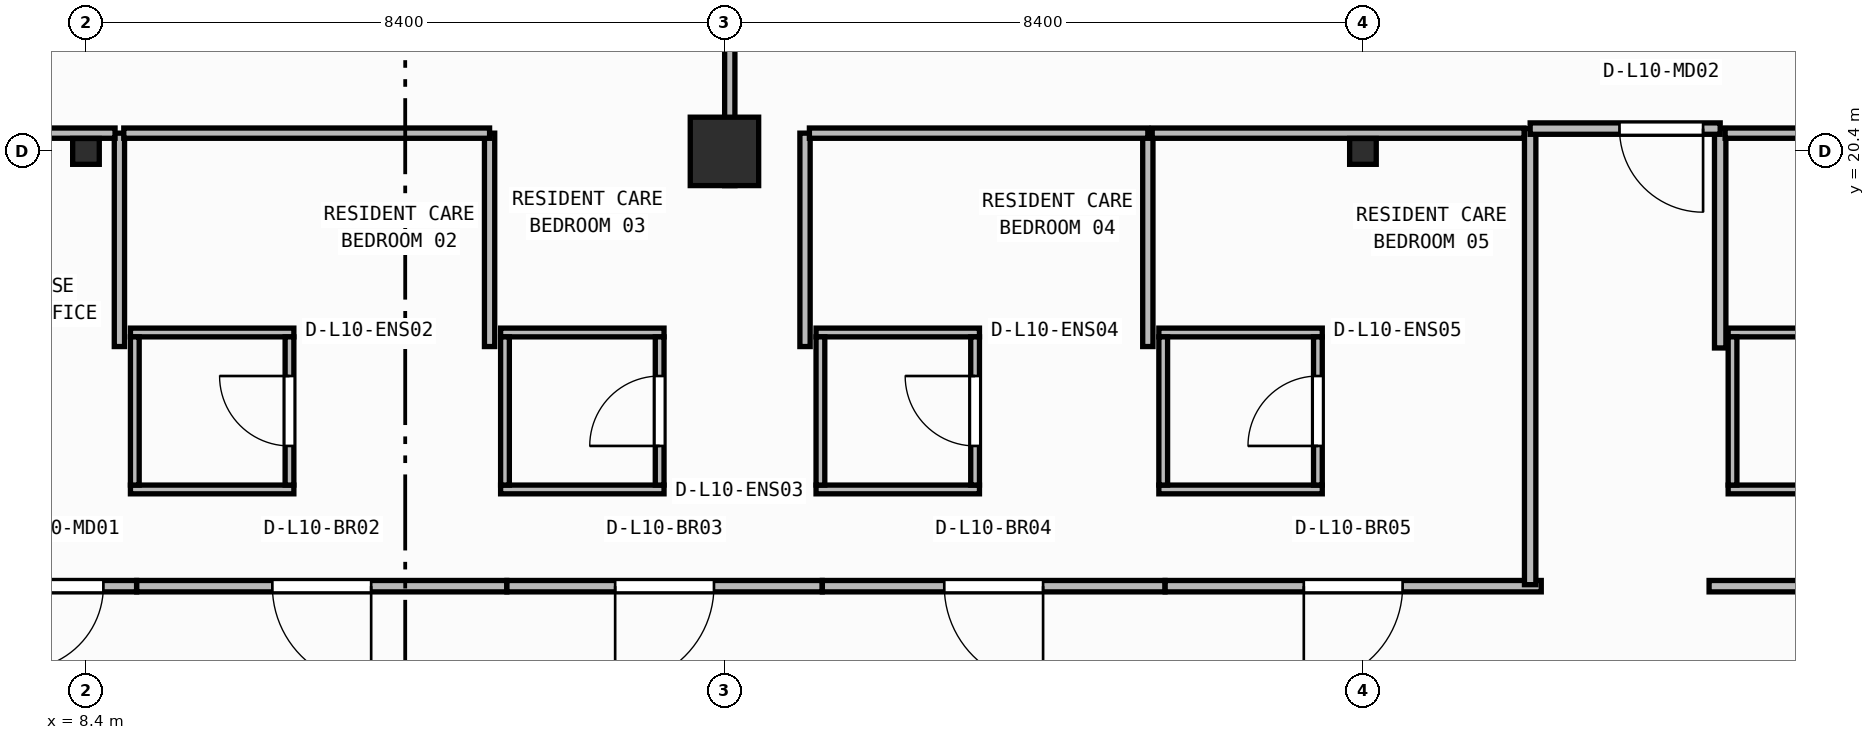
"""IFC4 building model, lengths in metres.
Left out: names, types, materials, properties, quantities, classifications, styles, units other than length and angle.
Written with IfcOpenShell. Run it as: python <this file> out.ifc"""

import sys

from ifc_helpers import new_model, si_unit, direction, frame, frame_2d, origin, origin_2d, place, context, subcontext, project, spatial, rectangle, i_section, extrude, element, fill, save


model = new_model("IFC4")
c1 = context("Model", 3, precision=1e-05, world=origin(), true_north=direction((0.0, 1.0)))
c2 = subcontext(c1, "Body", "Model", "MODEL_VIEW")
j1 = project(units=[si_unit("LENGTHUNIT", "METRE"), si_unit("PLANEANGLEUNIT", "RADIAN")], contexts=[c1])
p1 = place(None, origin())
s1 = spatial("IfcSite", under=j1, at=p1, CompositionType="ELEMENT")
p2 = place(p1, origin())
s2 = spatial("IfcBuilding", under=s1, at=p2, CompositionType="ELEMENT")
p3 = place(p2, frame((0.0, 0.0, 42.25)))
s3 = spatial("IfcBuildingStorey", under=s2, at=p3, CompositionType="ELEMENT", Elevation=42.25)
p4 = place(p3, frame((8.4, 20.4, 0.0), z_axis=(0.0, 0.0, 1.0), x_axis=(1.0, 0.0, 0.0)))
e1 = element("IfcColumn", 1, at=p4, inside=s3, PredefinedType="COLUMN", context=c2, shape_type="SweptSolid", body=[
    extrude(i_section(OverallWidth=0.35, OverallDepth=0.34, WebThickness=0.016, FlangeThickness=0.028, at=origin_2d()), origin(), (0.0, 0.0, 1.0), 3.95),
])
p5 = place(p3, frame((16.8, 20.4, 0.0), z_axis=(0.0, 0.0, 1.0), x_axis=(1.0, 0.0, 0.0)))
e2 = element("IfcColumn", 2, at=p5, inside=s3, PredefinedType="COLUMN", context=c2, shape_type="SweptSolid", body=[
    extrude(rectangle(XDim=0.9, YDim=0.9, at=origin_2d()), origin(), (0.0, 0.0, 1.0), 3.95),
])
p6 = place(p3, frame((25.2, 20.4, 0.0), z_axis=(0.0, 0.0, 1.0), x_axis=(1.0, 0.0, 0.0)))
e3 = element("IfcColumn", 3, at=p6, inside=s3, PredefinedType="COLUMN", context=c2, shape_type="SweptSolid", body=[
    extrude(i_section(OverallWidth=0.35, OverallDepth=0.34, WebThickness=0.016, FlangeThickness=0.028, at=origin_2d()), origin(), (0.0, 0.0, 1.0), 3.95),
])
for number, where, z_axis, x_axis in (
    (4, (8.985, 15.952, 0.0), (0.0, 0.0, 1.0), (1.0, 0.0, 0.0)),
    (5, (8.985, 18.018, 0.0), (0.0, 0.0, 1.0), (1.0, 0.0, 0.0)),
):
    element("IfcWall", number, at=place(p3, frame(where, z_axis=z_axis, x_axis=x_axis)), inside=s3, PredefinedType="PARTITIONING", context=c2, shape_type="SweptSolid", body=[
        extrude(rectangle(XDim=2.15, YDim=0.115, at=frame_2d((1.075, 0.0))), origin(), (0.0, 0.0, 1.0), 3.71),
    ])
p7 = place(p3, frame((9.042, 16.01, 0.0), z_axis=(0.0, 0.0, 1.0), x_axis=(0.0, 1.0, 0.0)))
e6 = element("IfcWall", 6, at=p7, inside=s3, PredefinedType="PARTITIONING", context=c2, shape_type="SweptSolid", body=[
    extrude(rectangle(XDim=1.95, YDim=0.115, at=frame_2d((0.975, 0.0))), origin(), (0.0, 0.0, 1.0), 3.71),
])
p8 = place(p3, frame((11.077, 16.01, 0.0), z_axis=(0.0, 0.0, 1.0), x_axis=(0.0, 1.0, 0.0)))
e7 = element("IfcWall", 7, at=p8, inside=s3, PredefinedType="PARTITIONING", context=c2, shape_type="SweptSolid", body=[
    extrude(rectangle(XDim=1.95, YDim=0.115, at=frame_2d((0.975, 0.0))), origin(), (0.0, 0.0, 1.0), 3.71),
])
p9 = place(p8, frame((0.515, 0.0, 0.0)))
e8 = element("IfcOpeningElement", 8, at=p9, cuts=e7, PredefinedType="OPENING", context=c2, shape_type="SweptSolid", body=[
    extrude(rectangle(XDim=0.92, YDim=2.1, at=frame_2d((0.46, 1.05))), frame((0.0, 0.067, 0.0), z_axis=(0.0, -1.0, 0.0), x_axis=(1.0, 0.0, 0.0)), (0.0, 0.0, 1.0), 0.135),
])
for number, where, z_axis, x_axis in (
    (9, (13.855, 15.952, 0.0), (0.0, 0.0, 1.0), (1.0, 0.0, 0.0)),
    (10, (13.855, 18.018, 0.0), (0.0, 0.0, 1.0), (1.0, 0.0, 0.0)),
):
    element("IfcWall", number, at=place(p3, frame(where, z_axis=z_axis, x_axis=x_axis)), inside=s3, PredefinedType="PARTITIONING", context=c2, shape_type="SweptSolid", body=[
        extrude(rectangle(XDim=2.15, YDim=0.115, at=frame_2d((1.075, 0.0))), origin(), (0.0, 0.0, 1.0), 3.71),
    ])
p10 = place(p3, frame((13.913, 16.01, 0.0), z_axis=(0.0, 0.0, 1.0), x_axis=(0.0, 1.0, 0.0)))
e11 = element("IfcWall", 11, at=p10, inside=s3, PredefinedType="PARTITIONING", context=c2, shape_type="SweptSolid", body=[
    extrude(rectangle(XDim=1.95, YDim=0.115, at=frame_2d((0.975, 0.0))), origin(), (0.0, 0.0, 1.0), 3.71),
])
p11 = place(p3, frame((15.948, 16.01, 0.0), z_axis=(0.0, 0.0, 1.0), x_axis=(0.0, 1.0, 0.0)))
e12 = element("IfcWall", 12, at=p11, inside=s3, PredefinedType="PARTITIONING", context=c2, shape_type="SweptSolid", body=[
    extrude(rectangle(XDim=1.95, YDim=0.115, at=frame_2d((0.975, 0.0))), origin(), (0.0, 0.0, 1.0), 3.71),
])
p12 = place(p11, frame((0.515, 0.0, 0.0)))
e13 = element("IfcOpeningElement", 13, at=p12, cuts=e12, PredefinedType="OPENING", context=c2, shape_type="SweptSolid", body=[
    extrude(rectangle(XDim=0.92, YDim=2.1, at=frame_2d((0.46, 1.05))), frame((0.0, 0.067, 0.0), z_axis=(0.0, -1.0, 0.0), x_axis=(1.0, 0.0, 0.0)), (0.0, 0.0, 1.0), 0.135),
])
for number, where, z_axis, x_axis in (
    (14, (18.005, 15.952, 0.0), (0.0, 0.0, 1.0), (1.0, 0.0, 0.0)),
    (15, (18.005, 18.018, 0.0), (0.0, 0.0, 1.0), (1.0, 0.0, 0.0)),
):
    element("IfcWall", number, at=place(p3, frame(where, z_axis=z_axis, x_axis=x_axis)), inside=s3, PredefinedType="PARTITIONING", context=c2, shape_type="SweptSolid", body=[
        extrude(rectangle(XDim=2.15, YDim=0.115, at=frame_2d((1.075, 0.0))), origin(), (0.0, 0.0, 1.0), 3.71),
    ])
p13 = place(p3, frame((18.062, 16.01, 0.0), z_axis=(0.0, 0.0, 1.0), x_axis=(0.0, 1.0, 0.0)))
e16 = element("IfcWall", 16, at=p13, inside=s3, PredefinedType="PARTITIONING", context=c2, shape_type="SweptSolid", body=[
    extrude(rectangle(XDim=1.95, YDim=0.115, at=frame_2d((0.975, 0.0))), origin(), (0.0, 0.0, 1.0), 3.71),
])
p14 = place(p3, frame((20.097, 16.01, 0.0), z_axis=(0.0, 0.0, 1.0), x_axis=(0.0, 1.0, 0.0)))
e17 = element("IfcWall", 17, at=p14, inside=s3, PredefinedType="PARTITIONING", context=c2, shape_type="SweptSolid", body=[
    extrude(rectangle(XDim=1.95, YDim=0.115, at=frame_2d((0.975, 0.0))), origin(), (0.0, 0.0, 1.0), 3.71),
])
p15 = place(p14, frame((0.515, 0.0, 0.0)))
e18 = element("IfcOpeningElement", 18, at=p15, cuts=e17, PredefinedType="OPENING", context=c2, shape_type="SweptSolid", body=[
    extrude(rectangle(XDim=0.92, YDim=2.1, at=frame_2d((0.46, 1.05))), frame((0.0, 0.067, 0.0), z_axis=(0.0, -1.0, 0.0), x_axis=(1.0, 0.0, 0.0)), (0.0, 0.0, 1.0), 0.135),
])
for number, where, z_axis, x_axis in (
    (19, (22.515, 15.952, 0.0), (0.0, 0.0, 1.0), (1.0, 0.0, 0.0)),
    (20, (22.515, 18.018, 0.0), (0.0, 0.0, 1.0), (1.0, 0.0, 0.0)),
):
    element("IfcWall", number, at=place(p3, frame(where, z_axis=z_axis, x_axis=x_axis)), inside=s3, PredefinedType="PARTITIONING", context=c2, shape_type="SweptSolid", body=[
        extrude(rectangle(XDim=2.15, YDim=0.115, at=frame_2d((1.075, 0.0))), origin(), (0.0, 0.0, 1.0), 3.71),
    ])
p16 = place(p3, frame((22.573, 16.01, 0.0), z_axis=(0.0, 0.0, 1.0), x_axis=(0.0, 1.0, 0.0)))
e21 = element("IfcWall", 21, at=p16, inside=s3, PredefinedType="PARTITIONING", context=c2, shape_type="SweptSolid", body=[
    extrude(rectangle(XDim=1.95, YDim=0.115, at=frame_2d((0.975, 0.0))), origin(), (0.0, 0.0, 1.0), 3.71),
])
p17 = place(p3, frame((24.607, 16.01, 0.0), z_axis=(0.0, 0.0, 1.0), x_axis=(0.0, 1.0, 0.0)))
e22 = element("IfcWall", 22, at=p17, inside=s3, PredefinedType="PARTITIONING", context=c2, shape_type="SweptSolid", body=[
    extrude(rectangle(XDim=1.95, YDim=0.115, at=frame_2d((0.975, 0.0))), origin(), (0.0, 0.0, 1.0), 3.71),
])
p18 = place(p17, frame((0.515, 0.0, 0.0)))
e23 = element("IfcOpeningElement", 23, at=p18, cuts=e22, PredefinedType="OPENING", context=c2, shape_type="SweptSolid", body=[
    extrude(rectangle(XDim=0.92, YDim=2.1, at=frame_2d((0.46, 1.05))), frame((0.0, 0.067, 0.0), z_axis=(0.0, -1.0, 0.0), x_axis=(1.0, 0.0, 0.0)), (0.0, 0.0, 1.0), 0.135),
])
p19 = place(p3, frame((30.005, 15.952, 0.0), z_axis=(0.0, 0.0, 1.0), x_axis=(1.0, 0.0, 0.0)))
e24 = element("IfcWall", 24, at=p19, inside=s3, PredefinedType="PARTITIONING", context=c2, shape_type="SweptSolid", body=[
    extrude(rectangle(XDim=2.15, YDim=0.115, at=frame_2d((1.075, 0.0))), origin(), (0.0, 0.0, 1.0), 3.381),
])
p20 = place(p3, frame((30.005, 18.018, 0.0), z_axis=(0.0, 0.0, 1.0), x_axis=(1.0, 0.0, 0.0)))
e25 = element("IfcWall", 25, at=p20, inside=s3, PredefinedType="PARTITIONING", context=c2, shape_type="SweptSolid", body=[
    extrude(rectangle(XDim=2.15, YDim=0.115, at=frame_2d((1.075, 0.0))), origin(), (0.0, 0.0, 1.0), 3.71),
])
p21 = place(p3, frame((30.062, 16.01, 0.0), z_axis=(0.0, 0.0, 1.0), x_axis=(0.0, 1.0, 0.0)))
e26 = element("IfcWall", 26, at=p21, inside=s3, PredefinedType="PARTITIONING", context=c2, shape_type="SweptSolid", body=[
    extrude(rectangle(XDim=1.95, YDim=0.115, at=frame_2d((0.975, 0.0))), origin(), (0.0, 0.0, 1.0), 3.71),
])
p22 = place(p3, frame((9.066, 14.68, 0.0), z_axis=(0.0, 0.0, 1.0), x_axis=(-1.0, 0.0, 0.0)))
e27 = element("IfcWall", 27, at=p22, inside=s3, PredefinedType="PARTITIONING", context=c2, shape_type="SweptSolid", body=[
    extrude(rectangle(XDim=1.974, YDim=0.15, at=frame_2d((0.987, 0.0))), origin(), (0.0, 0.0, 1.0), 3.71),
])
p23 = place(p22, frame((0.437, 0.0, 0.0)))
e28 = element("IfcOpeningElement", 28, at=p23, cuts=e27, PredefinedType="OPENING", context=c2, shape_type="SweptSolid", body=[
    extrude(rectangle(XDim=1.1, YDim=2.1, at=frame_2d((0.55, 1.05))), frame((0.0, 0.085, 0.0), z_axis=(0.0, -1.0, 0.0), x_axis=(1.0, 0.0, 0.0)), (0.0, 0.0, 1.0), 0.17),
])
p24 = place(p3, frame((13.936, 14.68, 0.0), z_axis=(0.0, 0.0, 1.0), x_axis=(-1.0, 0.0, 0.0)))
e29 = element("IfcWall", 29, at=p24, inside=s3, PredefinedType="PARTITIONING", context=c2, shape_type="SweptSolid", body=[
    extrude(rectangle(XDim=4.868, YDim=0.15, at=frame_2d((2.434, 0.0))), origin(), (0.0, 0.0, 1.0), 3.71),
])
p25 = place(p24, frame((1.784, 0.0, 0.0)))
e30 = element("IfcOpeningElement", 30, at=p25, cuts=e29, PredefinedType="OPENING", context=c2, shape_type="SweptSolid", body=[
    extrude(rectangle(XDim=1.3, YDim=2.15, at=frame_2d((0.65, 1.075))), frame((0.0, 0.085, 0.0), z_axis=(0.0, -1.0, 0.0), x_axis=(1.0, 0.0, 0.0)), (0.0, 0.0, 1.0), 0.17),
])
p26 = place(p3, frame((18.086, 14.68, 0.0), z_axis=(0.0, 0.0, 1.0), x_axis=(-1.0, 0.0, 0.0)))
e31 = element("IfcWall", 31, at=p26, inside=s3, PredefinedType="PARTITIONING", context=c2, shape_type="SweptSolid", body=[
    extrude(rectangle(XDim=4.148, YDim=0.15, at=frame_2d((2.074, 0.0))), origin(), (0.0, 0.0, 1.0), 3.71),
])
p27 = place(p26, frame((1.424, 0.0, 0.0)))
e32 = element("IfcOpeningElement", 32, at=p27, cuts=e31, PredefinedType="OPENING", context=c2, shape_type="SweptSolid", body=[
    extrude(rectangle(XDim=1.3, YDim=2.15, at=frame_2d((0.65, 1.075))), frame((0.0, 0.085, 0.0), z_axis=(0.0, -1.0, 0.0), x_axis=(1.0, 0.0, 0.0)), (0.0, 0.0, 1.0), 0.17),
])
p28 = place(p3, frame((22.596, 14.68, 0.0), z_axis=(0.0, 0.0, 1.0), x_axis=(-1.0, 0.0, 0.0)))
e33 = element("IfcWall", 33, at=p28, inside=s3, PredefinedType="PARTITIONING", context=c2, shape_type="SweptSolid", body=[
    extrude(rectangle(XDim=4.508, YDim=0.15, at=frame_2d((2.254, 0.0))), origin(), (0.0, 0.0, 1.0), 3.71),
])
p29 = place(p28, frame((1.604, 0.0, 0.0)))
e34 = element("IfcOpeningElement", 34, at=p29, cuts=e33, PredefinedType="OPENING", context=c2, shape_type="SweptSolid", body=[
    extrude(rectangle(XDim=1.3, YDim=2.15, at=frame_2d((0.65, 1.075))), frame((0.0, 0.085, 0.0), z_axis=(0.0, -1.0, 0.0), x_axis=(1.0, 0.0, 0.0)), (0.0, 0.0, 1.0), 0.17),
])
p30 = place(p3, frame((27.546, 14.68, 0.0), z_axis=(0.0, 0.0, 1.0), x_axis=(-1.0, 0.0, 0.0)))
e35 = element("IfcWall", 35, at=p30, inside=s3, PredefinedType="PARTITIONING", context=c2, shape_type="SweptSolid", body=[
    extrude(rectangle(XDim=4.948, YDim=0.15, at=frame_2d((2.474, 0.0))), origin(), (0.0, 0.0, 1.0), 3.71),
])
p31 = place(p30, frame((1.824, 0.0, 0.0)))
e36 = element("IfcOpeningElement", 36, at=p31, cuts=e35, PredefinedType="OPENING", context=c2, shape_type="SweptSolid", body=[
    extrude(rectangle(XDim=1.3, YDim=2.15, at=frame_2d((0.65, 1.075))), frame((0.0, 0.085, 0.0), z_axis=(0.0, -1.0, 0.0), x_axis=(1.0, 0.0, 0.0)), (0.0, 0.0, 1.0), 0.17),
])
p32 = place(p3, frame((35.186, 14.68, 0.0), z_axis=(0.0, 0.0, 1.0), x_axis=(-1.0, 0.0, 0.0)))
e37 = element("IfcWall", 37, at=p32, inside=s3, PredefinedType="PARTITIONING", context=c2, shape_type="SweptSolid", body=[
    extrude(rectangle(XDim=5.432, YDim=0.15, at=frame_2d((2.716, 0.0))), origin(), (0.0, 0.0, 1.0), 3.71),
])
p33 = place(p32, frame((2.066, 0.0, 0.0)))
e38 = element("IfcOpeningElement", 38, at=p33, cuts=e37, PredefinedType="OPENING", context=c2, shape_type="SweptSolid", body=[
    extrude(rectangle(XDim=1.3, YDim=2.15, at=frame_2d((0.65, 1.075))), frame((0.0, 0.085, 0.0), z_axis=(0.0, -1.0, 0.0), x_axis=(1.0, 0.0, 0.0)), (0.0, 0.0, 1.0), 0.17),
])
p34 = place(p3, frame((27.4, 20.7, 0.0), z_axis=(0.0, 0.0, 1.0), x_axis=(0.0, -1.0, 0.0)))
e39 = element("IfcWall", 39, at=p34, inside=s3, PredefinedType="PARTITIONING", context=c2, shape_type="SweptSolid", body=[
    extrude(rectangle(XDim=6.0, YDim=0.15, at=frame_2d((3.0, 0.0))), origin(), (0.0, 0.0, 1.0), 3.71),
])
p35 = place(p3, frame((29.9, 17.814, 0.0), z_axis=(0.0, 0.0, 1.0), x_axis=(0.0, 1.0, 0.0)))
e40 = element("IfcWall", 40, at=p35, inside=s3, PredefinedType="PARTITIONING", context=c2, shape_type="SweptSolid", body=[
    extrude(rectangle(XDim=2.886, YDim=0.15, at=frame_2d((1.443, 0.0))), origin(), (0.0, 0.0, 1.0), 3.71),
])
p36 = place(p3, frame((29.9, 20.7, 0.0), z_axis=(0.0, 0.0, 1.0), x_axis=(-1.0, 0.0, 0.0)))
e41 = element("IfcWall", 41, at=p36, inside=s3, PredefinedType="PARTITIONING", context=c2, shape_type="SweptSolid", body=[
    extrude(rectangle(XDim=2.5, YDim=0.15, at=frame_2d((1.25, 0.0))), origin(), (0.0, 0.0, 1.0), 3.073),
])
p37 = place(p36, frame((0.225, 0.0, 0.0)))
e42 = element("IfcOpeningElement", 42, at=p37, cuts=e41, PredefinedType="OPENING", context=c2, shape_type="SweptSolid", body=[
    extrude(rectangle(XDim=1.1, YDim=2.1, at=frame_2d((0.55, 1.05))), frame((0.0, 0.085, 0.0), z_axis=(0.0, -1.0, 0.0), x_axis=(1.0, 0.0, 0.0)), (0.0, 0.0, 1.0), 0.17),
])
p38 = place(p3, frame((8.84, 17.833, 0.0), z_axis=(0.0, 0.0, 1.0), x_axis=(0.0, 1.0, 0.0)))
e43 = element("IfcWall", 43, at=p38, inside=s3, PredefinedType="PARTITIONING", context=c2, shape_type="SweptSolid", body=[
    extrude(rectangle(XDim=2.807, YDim=0.135, at=frame_2d((1.404, 0.0))), origin(), (0.0, 0.0, 1.0), 3.71),
])
p39 = place(p3, frame((8.782, 20.64, 0.0), z_axis=(0.0, 0.0, 1.0), x_axis=(-1.0, 0.0, 0.0)))
e44 = element("IfcWall", 44, at=p39, inside=s3, PredefinedType="PARTITIONING", context=c2, shape_type="SweptSolid", body=[
    extrude(rectangle(XDim=4.395, YDim=0.135, at=frame_2d((2.198, 0.0))), origin(), (0.0, 0.0, 1.0), 3.073),
])
p40 = place(p39, frame((3.023, 0.0, 0.0)))
e45 = element("IfcOpeningElement", 45, at=p40, cuts=e44, PredefinedType="OPENING", context=c2, shape_type="SweptSolid", body=[
    extrude(rectangle(XDim=1.1, YDim=2.1, at=frame_2d((0.55, 1.05))), frame((0.0, 0.077, 0.0), z_axis=(0.0, -1.0, 0.0), x_axis=(1.0, 0.0, 0.0)), (0.0, 0.0, 1.0), 0.155),
])
p41 = place(p3, frame((13.71, 17.833, 0.0), z_axis=(0.0, 0.0, 1.0), x_axis=(0.0, 1.0, 0.0)))
e46 = element("IfcWall", 46, at=p41, inside=s3, PredefinedType="PARTITIONING", context=c2, shape_type="SweptSolid", body=[
    extrude(rectangle(XDim=2.807, YDim=0.135, at=frame_2d((1.404, 0.0))), origin(), (0.0, 0.0, 1.0), 3.71),
])
p42 = place(p3, frame((13.71, 20.64, 0.0), z_axis=(0.0, 0.0, 1.0), x_axis=(-1.0, 0.0, 0.0)))
e47 = element("IfcWall", 47, at=p42, inside=s3, PredefinedType="PARTITIONING", context=c2, shape_type="SweptSolid", body=[
    extrude(rectangle(XDim=4.812, YDim=0.135, at=frame_2d((2.406, 0.0))), origin(), (0.0, 0.0, 1.0), 3.073),
])
for number, where, z_axis, x_axis in (
    (48, (17.86, 17.833, 0.0), (0.0, 0.0, 1.0), (0.0, 1.0, 0.0)),
    (49, (22.37, 17.833, 0.0), (0.0, 0.0, 1.0), (0.0, 1.0, 0.0)),
):
    element("IfcWall", number, at=place(p3, frame(where, z_axis=z_axis, x_axis=x_axis)), inside=s3, PredefinedType="PARTITIONING", context=c2, shape_type="SweptSolid", body=[
        extrude(rectangle(XDim=2.807, YDim=0.135, at=frame_2d((1.404, 0.0))), origin(), (0.0, 0.0, 1.0), 3.71),
    ])
p43 = place(p3, frame((22.37, 20.64, 0.0), z_axis=(0.0, 0.0, 1.0), x_axis=(-1.0, 0.0, 0.0)))
e50 = element("IfcWall", 50, at=p43, inside=s3, PredefinedType="PARTITIONING", context=c2, shape_type="SweptSolid", body=[
    extrude(rectangle(XDim=4.453, YDim=0.135, at=frame_2d((2.226, 0.0))), origin(), (0.0, 0.0, 1.0), 3.073),
])
p44 = place(p3, frame((27.32, 20.64, 0.0), z_axis=(0.0, 0.0, 1.0), x_axis=(-1.0, 0.0, 0.0)))
e51 = element("IfcWall", 51, at=p44, inside=s3, PredefinedType="PARTITIONING", context=c2, shape_type="SweptSolid", body=[
    extrude(rectangle(XDim=4.893, YDim=0.135, at=frame_2d((2.446, 0.0))), origin(), (0.0, 0.0, 1.0), 3.073),
])
p45 = place(p3, frame((34.96, 20.64, 0.0), z_axis=(0.0, 0.0, 1.0), x_axis=(-1.0, 0.0, 0.0)))
e52 = element("IfcWall", 52, at=p45, inside=s3, PredefinedType="PARTITIONING", context=c2, shape_type="SweptSolid", body=[
    extrude(rectangle(XDim=4.995, YDim=0.135, at=frame_2d((2.498, 0.0))), origin(), (0.0, 0.0, 1.0), 3.073),
])
p46 = place(p3, frame((16.87, 19.95, 0.0), z_axis=(0.0, 0.0, 1.0), x_axis=(0.0, 1.0, 0.0)))
e53 = element("IfcWall", 53, at=p46, inside=s3, PredefinedType="PARTITIONING", context=c2, shape_type="SweptSolid", body=[
    extrude(rectangle(XDim=15.077, YDim=0.135, at=frame_2d((7.539, 0.0))), origin(), (0.0, 0.0, 1.0), 3.073),
])
p47 = place(p9, origin())
e54 = element("IfcDoor", 54, at=p47, inside=s3, OperationType="SINGLE_SWING_RIGHT", PredefinedType="DOOR", context=c2, shape_type="SweptSolid", body=[
    extrude(rectangle(XDim=0.92, YDim=2.1, at=frame_2d((0.46, 1.05))), frame((0.0, 0.025, 0.0), z_axis=(0.0, -1.0, 0.0), x_axis=(1.0, 0.0, 0.0)), (0.0, 0.0, 1.0), 0.05),
])
fill(e8, e54)
p48 = place(p12, origin())
e55 = element("IfcDoor", 55, at=p48, inside=s3, OperationType="SINGLE_SWING_LEFT", PredefinedType="DOOR", context=c2, shape_type="SweptSolid", body=[
    extrude(rectangle(XDim=0.92, YDim=2.1, at=frame_2d((0.46, 1.05))), frame((0.0, 0.025, 0.0), z_axis=(0.0, -1.0, 0.0), x_axis=(1.0, 0.0, 0.0)), (0.0, 0.0, 1.0), 0.05),
])
fill(e13, e55)
p49 = place(p15, origin())
e56 = element("IfcDoor", 56, at=p49, inside=s3, OperationType="SINGLE_SWING_RIGHT", PredefinedType="DOOR", context=c2, shape_type="SweptSolid", body=[
    extrude(rectangle(XDim=0.92, YDim=2.1, at=frame_2d((0.46, 1.05))), frame((0.0, 0.025, 0.0), z_axis=(0.0, -1.0, 0.0), x_axis=(1.0, 0.0, 0.0)), (0.0, 0.0, 1.0), 0.05),
])
fill(e18, e56)
p50 = place(p18, origin())
e57 = element("IfcDoor", 57, at=p50, inside=s3, OperationType="SINGLE_SWING_LEFT", PredefinedType="DOOR", context=c2, shape_type="SweptSolid", body=[
    extrude(rectangle(XDim=0.92, YDim=2.1, at=frame_2d((0.46, 1.05))), frame((0.0, 0.025, 0.0), z_axis=(0.0, -1.0, 0.0), x_axis=(1.0, 0.0, 0.0)), (0.0, 0.0, 1.0), 0.05),
])
fill(e23, e57)
p51 = place(p23, origin())
e58 = element("IfcDoor", 58, at=p51, inside=s3, OperationType="SINGLE_SWING_RIGHT", PredefinedType="DOOR", context=c2, shape_type="SweptSolid", body=[
    extrude(rectangle(XDim=1.1, YDim=2.1, at=frame_2d((0.55, 1.05))), frame((0.0, 0.025, 0.0), z_axis=(0.0, -1.0, 0.0), x_axis=(1.0, 0.0, 0.0)), (0.0, 0.0, 1.0), 0.05),
])
fill(e28, e58)
p52 = place(p25, origin())
e59 = element("IfcDoor", 59, at=p52, inside=s3, OperationType="SINGLE_SWING_LEFT", PredefinedType="DOOR", context=c2, shape_type="SweptSolid", body=[
    extrude(rectangle(XDim=1.3, YDim=2.15, at=frame_2d((0.65, 1.075))), frame((0.0, 0.025, 0.0), z_axis=(0.0, -1.0, 0.0), x_axis=(1.0, 0.0, 0.0)), (0.0, 0.0, 1.0), 0.05),
])
fill(e30, e59)
p53 = place(p27, origin())
e60 = element("IfcDoor", 60, at=p53, inside=s3, OperationType="SINGLE_SWING_RIGHT", PredefinedType="DOOR", context=c2, shape_type="SweptSolid", body=[
    extrude(rectangle(XDim=1.3, YDim=2.15, at=frame_2d((0.65, 1.075))), frame((0.0, 0.025, 0.0), z_axis=(0.0, -1.0, 0.0), x_axis=(1.0, 0.0, 0.0)), (0.0, 0.0, 1.0), 0.05),
])
fill(e32, e60)
p54 = place(p29, origin())
e61 = element("IfcDoor", 61, at=p54, inside=s3, OperationType="SINGLE_SWING_LEFT", PredefinedType="DOOR", context=c2, shape_type="SweptSolid", body=[
    extrude(rectangle(XDim=1.3, YDim=2.15, at=frame_2d((0.65, 1.075))), frame((0.0, 0.025, 0.0), z_axis=(0.0, -1.0, 0.0), x_axis=(1.0, 0.0, 0.0)), (0.0, 0.0, 1.0), 0.05),
])
fill(e34, e61)
p55 = place(p31, origin())
e62 = element("IfcDoor", 62, at=p55, inside=s3, OperationType="SINGLE_SWING_RIGHT", PredefinedType="DOOR", context=c2, shape_type="SweptSolid", body=[
    extrude(rectangle(XDim=1.3, YDim=2.15, at=frame_2d((0.65, 1.075))), frame((0.0, 0.025, 0.0), z_axis=(0.0, -1.0, 0.0), x_axis=(1.0, 0.0, 0.0)), (0.0, 0.0, 1.0), 0.05),
])
fill(e36, e62)
p56 = place(p37, origin())
e63 = element("IfcDoor", 63, at=p56, inside=s3, OperationType="SINGLE_SWING_LEFT", PredefinedType="DOOR", context=c2, shape_type="SweptSolid", body=[
    extrude(rectangle(XDim=1.1, YDim=2.1, at=frame_2d((0.55, 1.05))), frame((0.0, 0.025, 0.0), z_axis=(0.0, -1.0, 0.0), x_axis=(1.0, 0.0, 0.0)), (0.0, 0.0, 1.0), 0.05),
])
fill(e42, e63)
save(model, sys.argv[1])
